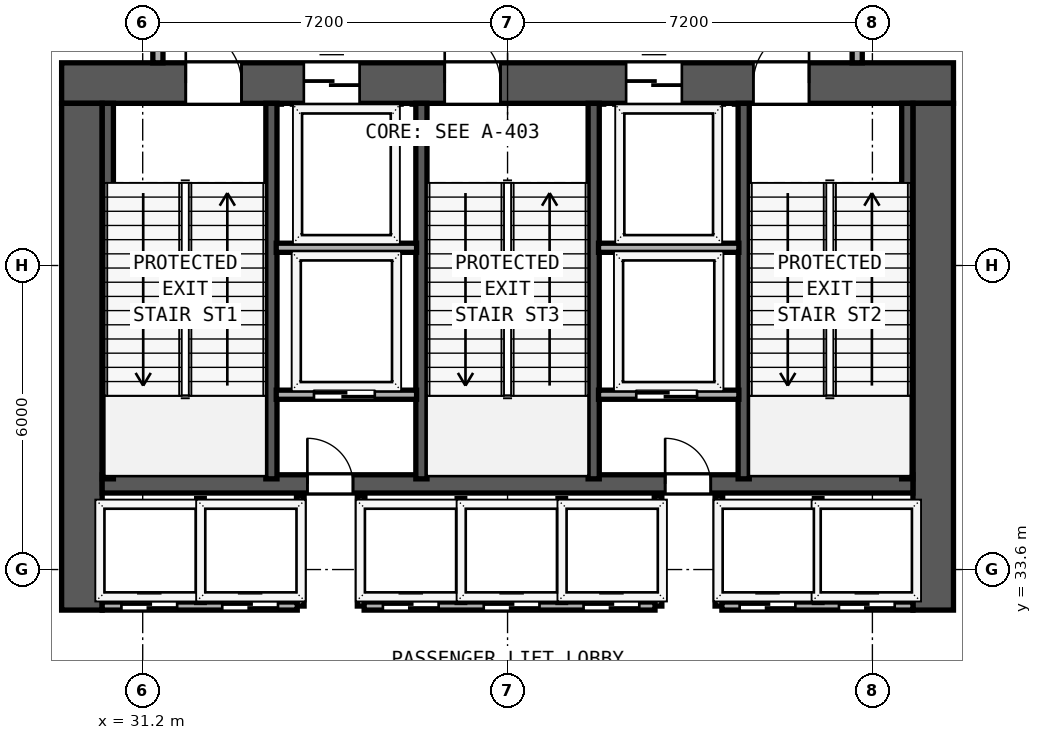
"""IFC4 building model, lengths in metres.
Left out: names, types, materials, properties, quantities, classifications, styles, units other than length and angle.
Written with IfcOpenShell. Run it as: python <this file> out.ifc"""

import sys

from ifc_helpers import new_model, si_unit, direction, frame, frame_2d, origin, place, context, subcontext, project, spatial, rectangle, extrude, element, fill, save


model = new_model("IFC4")
c1 = context("Model", 3, precision=1e-05, world=origin(), true_north=direction((0.0, 1.0)))
c2 = subcontext(c1, "Body", "Model", "MODEL_VIEW")
j1 = project(units=[si_unit("LENGTHUNIT", "METRE"), si_unit("PLANEANGLEUNIT", "RADIAN")], contexts=[c1])
p1 = place(None, origin())
s1 = spatial("IfcSite", under=j1, at=p1, CompositionType="ELEMENT")
p2 = place(p1, origin())
s2 = spatial("IfcBuilding", under=s1, at=p2, CompositionType="ELEMENT")
p3 = place(p2, origin())
s3 = spatial("IfcBuildingStorey", under=s2, at=p3, CompositionType="ELEMENT", Elevation=0.0)
p4 = place(p3, frame((29.6, 43.2, 0.0), z_axis=(0.0, 0.0, 1.0), x_axis=(1.0, 0.0, 0.0)))
e1 = element("IfcWall", 1, at=p4, inside=s3, PredefinedType="SHEAR", context=c2, shape_type="SweptSolid", body=[
    extrude(rectangle(XDim=17.6, YDim=0.8, at=frame_2d((8.8, 0.0))), origin(), (0.0, 0.0, 1.0), 5.16),
])
p5 = place(p4, frame((2.45, 0.0, 0.0)))
e2 = element("IfcOpeningElement", 2, at=p5, cuts=e1, PredefinedType="OPENING", context=c2, shape_type="SweptSolid", body=[
    extrude(rectangle(XDim=1.1, YDim=2.15, at=frame_2d((0.55, 1.075))), frame((0.0, 0.41, 0.0), z_axis=(0.0, -1.0, 0.0), x_axis=(1.0, 0.0, 0.0)), (0.0, 0.0, 1.0), 0.82),
])
p6 = place(p4, frame((7.56, 0.0, 0.0)))
e3 = element("IfcOpeningElement", 3, at=p6, cuts=e1, PredefinedType="OPENING", context=c2, shape_type="SweptSolid", body=[
    extrude(rectangle(XDim=1.1, YDim=2.15, at=frame_2d((0.55, 1.075))), frame((0.0, 0.41, 0.0), z_axis=(0.0, -1.0, 0.0), x_axis=(1.0, 0.0, 0.0)), (0.0, 0.0, 1.0), 0.82),
])
p7 = place(p4, frame((13.65, 0.0, 0.0)))
e4 = element("IfcOpeningElement", 4, at=p7, cuts=e1, PredefinedType="OPENING", context=c2, shape_type="SweptSolid", body=[
    extrude(rectangle(XDim=1.1, YDim=2.15, at=frame_2d((0.55, 1.075))), frame((0.0, 0.41, 0.0), z_axis=(0.0, -1.0, 0.0), x_axis=(1.0, 0.0, 0.0)), (0.0, 0.0, 1.0), 0.82),
])
p8 = place(p4, frame((4.78, 0.0, 0.0)))
e5 = element("IfcOpeningElement", 5, at=p8, cuts=e1, PredefinedType="OPENING", context=c2, shape_type="SweptSolid", body=[
    extrude(rectangle(XDim=1.1, YDim=2.2, at=frame_2d((0.55, 1.1))), frame((0.0, 0.41, 0.0), z_axis=(0.0, -1.0, 0.0), x_axis=(1.0, 0.0, 0.0)), (0.0, 0.0, 1.0), 0.82),
])
p9 = place(p4, frame((11.14, 0.0, 0.0)))
e6 = element("IfcOpeningElement", 6, at=p9, cuts=e1, PredefinedType="OPENING", context=c2, shape_type="SweptSolid", body=[
    extrude(rectangle(XDim=1.1, YDim=2.2, at=frame_2d((0.55, 1.1))), frame((0.0, 0.41, 0.0), z_axis=(0.0, -1.0, 0.0), x_axis=(1.0, 0.0, 0.0)), (0.0, 0.0, 1.0), 0.82),
])
for number, where, z_axis, x_axis in (
    (7, (30.0, 32.8, 0.0), (0.0, 0.0, 1.0), (0.0, 1.0, 0.0)),
    (8, (46.8, 32.8, 0.0), (0.0, 0.0, 1.0), (0.0, 1.0, 0.0)),
):
    element("IfcWall", number, at=place(p3, frame(where, z_axis=z_axis, x_axis=x_axis)), inside=s3, PredefinedType="SHEAR", context=c2, shape_type="SweptSolid", body=[
        extrude(rectangle(XDim=10.0, YDim=0.8, at=frame_2d((5.0, 0.0))), origin(), (0.0, 0.0, 1.0), 5.16),
    ])
p10 = place(p3, frame((30.4, 35.29, 0.0), z_axis=(0.0, 0.0, 1.0), x_axis=(1.0, 0.0, 0.0)))
e9 = element("IfcWall", 9, at=p10, inside=s3, PredefinedType="SHEAR", context=c2, shape_type="SweptSolid", body=[
    extrude(rectangle(XDim=16.0, YDim=0.36, at=frame_2d((8.0, 0.0))), origin(), (0.0, 0.0, 1.0), 5.16),
])
p11 = place(p10, frame((4.95, 0.0, 0.0), z_axis=(0.0, 0.0, 1.0), x_axis=(-1.0, 0.0, 0.0)))
e10 = element("IfcOpeningElement", 10, at=p11, cuts=e9, PredefinedType="OPENING", context=c2, shape_type="SweptSolid", body=[
    extrude(rectangle(XDim=0.9, YDim=2.1, at=frame_2d((0.45, 1.05))), frame((0.0, 0.19, 0.0), z_axis=(0.0, -1.0, 0.0), x_axis=(1.0, 0.0, 0.0)), (0.0, 0.0, 1.0), 0.38),
])
p12 = place(p10, frame((12.01, 0.0, 0.0), z_axis=(0.0, 0.0, 1.0), x_axis=(-1.0, 0.0, 0.0)))
e11 = element("IfcOpeningElement", 11, at=p12, cuts=e9, PredefinedType="OPENING", context=c2, shape_type="SweptSolid", body=[
    extrude(rectangle(XDim=0.9, YDim=2.1, at=frame_2d((0.45, 1.05))), frame((0.0, 0.19, 0.0), z_axis=(0.0, -1.0, 0.0), x_axis=(1.0, 0.0, 0.0)), (0.0, 0.0, 1.0), 0.38),
])
for number, where, z_axis, x_axis in (
    (12, (30.512, 35.39, 0.0), (0.0, 0.0, 1.0), (0.0, 1.0, 0.0)),
    (13, (33.74, 35.39, 0.0), (0.0, 0.0, 1.0), (0.0, 1.0, 0.0)),
    (14, (36.7, 35.39, 0.0), (0.0, 0.0, 1.0), (0.0, 1.0, 0.0)),
    (15, (40.1, 35.39, 0.0), (0.0, 0.0, 1.0), (0.0, 1.0, 0.0)),
    (16, (43.06, 35.39, 0.0), (0.0, 0.0, 1.0), (0.0, 1.0, 0.0)),
    (17, (46.288, 35.39, 0.0), (0.0, 0.0, 1.0), (0.0, 1.0, 0.0)),
):
    element("IfcWall", number, at=place(p3, frame(where, z_axis=z_axis, x_axis=x_axis)), inside=s3, PredefinedType="SHEAR", context=c2, shape_type="SweptSolid", body=[
        extrude(rectangle(XDim=7.41, YDim=0.22, at=frame_2d((3.705, 0.0))), origin(), (0.0, 0.0, 1.0), 5.16),
    ])
for number, where, z_axis, x_axis in (
    (18, (31.5, 43.6, 0.0), (0.0, 0.0, 1.0), (0.0, 1.0, 0.0)),
    (19, (45.3, 43.6, 0.0), (0.0, 0.0, 1.0), (0.0, 1.0, 0.0)),
):
    element("IfcWall", number, at=place(p3, frame(where, z_axis=z_axis, x_axis=x_axis)), inside=s3, PredefinedType="SOLIDWALL", context=c2, shape_type="SweptSolid", body=[
        extrude(rectangle(XDim=2.835, YDim=0.2, at=frame_2d((1.417, 0.0))), origin(), (0.0, 0.0, 1.0), 5.16),
    ])
for number, where, z_axis, x_axis in (
    (20, (33.835, 39.95, 0.0), (0.0, 0.0, 1.0), (1.0, 0.0, 0.0)),
    (21, (40.195, 39.95, 0.0), (0.0, 0.0, 1.0), (1.0, 0.0, 0.0)),
):
    element("IfcWall", number, at=place(p3, frame(where, z_axis=z_axis, x_axis=x_axis)), inside=s3, PredefinedType="SOLIDWALL", context=c2, shape_type="SweptSolid", body=[
        extrude(rectangle(XDim=2.77, YDim=0.18, at=frame_2d((1.385, 0.0))), origin(), (0.0, 0.0, 1.0), 5.16),
    ])
p13 = place(p3, frame((33.835, 37.05, 0.0), z_axis=(0.0, 0.0, 1.0), x_axis=(1.0, 0.0, 0.0)))
e22 = element("IfcWall", 22, at=p13, inside=s3, PredefinedType="SOLIDWALL", context=c2, shape_type="SweptSolid", body=[
    extrude(rectangle(XDim=2.77, YDim=0.18, at=frame_2d((1.385, 0.0))), origin(), (0.0, 0.0, 1.0), 5.16),
])
p14 = place(p13, frame((1.945, 0.0, 0.0), z_axis=(0.0, 0.0, 1.0), x_axis=(-1.0, 0.0, 0.0)))
e23 = element("IfcOpeningElement", 23, at=p14, cuts=e22, PredefinedType="OPENING", context=c2, shape_type="SweptSolid", body=[
    extrude(rectangle(XDim=1.2, YDim=2.2, at=frame_2d((0.6, 1.1))), frame((0.0, 0.1, 0.0), z_axis=(0.0, -1.0, 0.0), x_axis=(1.0, 0.0, 0.0)), (0.0, 0.0, 1.0), 0.2),
])
for number, where, z_axis, x_axis in (
    (24, (34.31, 32.88, 0.0), (0.0, 0.0, 1.0), (0.0, 1.0, 0.0)),
    (25, (35.51, 32.88, 0.0), (0.0, 0.0, 1.0), (0.0, 1.0, 0.0)),
):
    element("IfcWall", number, at=place(p3, frame(where, z_axis=z_axis, x_axis=x_axis)), inside=s3, PredefinedType="SOLIDWALL", context=c2, shape_type="SweptSolid", body=[
        extrude(rectangle(XDim=2.17, YDim=0.15, at=frame_2d((1.085, 0.0))), origin(), (0.0, 0.0, 1.0), 5.16),
    ])
p15 = place(p3, frame((40.195, 37.05, 0.0), z_axis=(0.0, 0.0, 1.0), x_axis=(1.0, 0.0, 0.0)))
e26 = element("IfcWall", 26, at=p15, inside=s3, PredefinedType="SOLIDWALL", context=c2, shape_type="SweptSolid", body=[
    extrude(rectangle(XDim=2.77, YDim=0.18, at=frame_2d((1.385, 0.0))), origin(), (0.0, 0.0, 1.0), 5.16),
])
p16 = place(p15, frame((1.945, 0.0, 0.0), z_axis=(0.0, 0.0, 1.0), x_axis=(-1.0, 0.0, 0.0)))
e27 = element("IfcOpeningElement", 27, at=p16, cuts=e26, PredefinedType="OPENING", context=c2, shape_type="SweptSolid", body=[
    extrude(rectangle(XDim=1.2, YDim=2.2, at=frame_2d((0.6, 1.1))), frame((0.0, 0.1, 0.0), z_axis=(0.0, -1.0, 0.0), x_axis=(1.0, 0.0, 0.0)), (0.0, 0.0, 1.0), 0.2),
])
for number, where, z_axis, x_axis in (
    (28, (41.37, 32.88, 0.0), (0.0, 0.0, 1.0), (0.0, 1.0, 0.0)),
    (29, (42.57, 32.88, 0.0), (0.0, 0.0, 1.0), (0.0, 1.0, 0.0)),
):
    element("IfcWall", number, at=place(p3, frame(where, z_axis=z_axis, x_axis=x_axis)), inside=s3, PredefinedType="SOLIDWALL", context=c2, shape_type="SweptSolid", body=[
        extrude(rectangle(XDim=2.17, YDim=0.15, at=frame_2d((1.085, 0.0))), origin(), (0.0, 0.0, 1.0), 5.16),
    ])
p17 = place(p3, frame((30.4, 32.88, 0.0), z_axis=(0.0, 0.0, 1.0), x_axis=(1.0, 0.0, 0.0)))
e30 = element("IfcWall", 30, at=p17, inside=s3, PredefinedType="SOLIDWALL", context=c2, shape_type="SweptSolid", body=[
    extrude(rectangle(XDim=3.85, YDim=0.16, at=frame_2d((1.925, 0.0))), origin(), (0.0, 0.0, 1.0), 5.16),
])
p18 = place(p17, frame((1.48, 0.0, 0.0), z_axis=(0.0, 0.0, 1.0), x_axis=(-1.0, 0.0, 0.0)))
e31 = element("IfcOpeningElement", 31, at=p18, cuts=e30, PredefinedType="OPENING", context=c2, shape_type="SweptSolid", body=[
    extrude(rectangle(XDim=1.1, YDim=2.2, at=frame_2d((0.55, 1.1))), frame((0.0, 0.09, 0.0), z_axis=(0.0, -1.0, 0.0), x_axis=(1.0, 0.0, 0.0)), (0.0, 0.0, 1.0), 0.18),
])
p19 = place(p17, frame((3.47, 0.0, 0.0), z_axis=(0.0, 0.0, 1.0), x_axis=(-1.0, 0.0, 0.0)))
e32 = element("IfcOpeningElement", 32, at=p19, cuts=e30, PredefinedType="OPENING", context=c2, shape_type="SweptSolid", body=[
    extrude(rectangle(XDim=1.1, YDim=2.2, at=frame_2d((0.55, 1.1))), frame((0.0, 0.09, 0.0), z_axis=(0.0, -1.0, 0.0), x_axis=(1.0, 0.0, 0.0)), (0.0, 0.0, 1.0), 0.18),
])
p20 = place(p3, frame((35.57, 32.88, 0.0), z_axis=(0.0, 0.0, 1.0), x_axis=(1.0, 0.0, 0.0)))
e33 = element("IfcWall", 33, at=p20, inside=s3, PredefinedType="SOLIDWALL", context=c2, shape_type="SweptSolid", body=[
    extrude(rectangle(XDim=5.74, YDim=0.16, at=frame_2d((2.87, 0.0))), origin(), (0.0, 0.0, 1.0), 5.16),
])
p21 = place(p20, frame((1.47, 0.0, 0.0), z_axis=(0.0, 0.0, 1.0), x_axis=(-1.0, 0.0, 0.0)))
e34 = element("IfcOpeningElement", 34, at=p21, cuts=e33, PredefinedType="OPENING", context=c2, shape_type="SweptSolid", body=[
    extrude(rectangle(XDim=1.1, YDim=2.2, at=frame_2d((0.55, 1.1))), frame((0.0, 0.09, 0.0), z_axis=(0.0, -1.0, 0.0), x_axis=(1.0, 0.0, 0.0)), (0.0, 0.0, 1.0), 0.18),
])
p22 = place(p20, frame((3.46, 0.0, 0.0), z_axis=(0.0, 0.0, 1.0), x_axis=(-1.0, 0.0, 0.0)))
e35 = element("IfcOpeningElement", 35, at=p22, cuts=e33, PredefinedType="OPENING", context=c2, shape_type="SweptSolid", body=[
    extrude(rectangle(XDim=1.1, YDim=2.2, at=frame_2d((0.55, 1.1))), frame((0.0, 0.09, 0.0), z_axis=(0.0, -1.0, 0.0), x_axis=(1.0, 0.0, 0.0)), (0.0, 0.0, 1.0), 0.18),
])
p23 = place(p20, frame((5.43, 0.0, 0.0), z_axis=(0.0, 0.0, 1.0), x_axis=(-1.0, 0.0, 0.0)))
e36 = element("IfcOpeningElement", 36, at=p23, cuts=e33, PredefinedType="OPENING", context=c2, shape_type="SweptSolid", body=[
    extrude(rectangle(XDim=1.1, YDim=2.2, at=frame_2d((0.55, 1.1))), frame((0.0, 0.09, 0.0), z_axis=(0.0, -1.0, 0.0), x_axis=(1.0, 0.0, 0.0)), (0.0, 0.0, 1.0), 0.18),
])
p24 = place(p3, frame((42.63, 32.88, 0.0), z_axis=(0.0, 0.0, 1.0), x_axis=(1.0, 0.0, 0.0)))
e37 = element("IfcWall", 37, at=p24, inside=s3, PredefinedType="SOLIDWALL", context=c2, shape_type="SweptSolid", body=[
    extrude(rectangle(XDim=3.77, YDim=0.16, at=frame_2d((1.885, 0.0))), origin(), (0.0, 0.0, 1.0), 5.16),
])
p25 = place(p24, frame((1.45, 0.0, 0.0), z_axis=(0.0, 0.0, 1.0), x_axis=(-1.0, 0.0, 0.0)))
e38 = element("IfcOpeningElement", 38, at=p25, cuts=e37, PredefinedType="OPENING", context=c2, shape_type="SweptSolid", body=[
    extrude(rectangle(XDim=1.1, YDim=2.2, at=frame_2d((0.55, 1.1))), frame((0.0, 0.09, 0.0), z_axis=(0.0, -1.0, 0.0), x_axis=(1.0, 0.0, 0.0)), (0.0, 0.0, 1.0), 0.18),
])
p26 = place(p24, frame((3.41, 0.0, 0.0), z_axis=(0.0, 0.0, 1.0), x_axis=(-1.0, 0.0, 0.0)))
e39 = element("IfcOpeningElement", 39, at=p26, cuts=e37, PredefinedType="OPENING", context=c2, shape_type="SweptSolid", body=[
    extrude(rectangle(XDim=1.1, YDim=2.2, at=frame_2d((0.55, 1.1))), frame((0.0, 0.09, 0.0), z_axis=(0.0, -1.0, 0.0), x_axis=(1.0, 0.0, 0.0)), (0.0, 0.0, 1.0), 0.18),
])
for number, where, z_axis, x_axis in (
    (40, (32.34, 32.95, 0.0), (0.0, 0.0, 1.0), (0.0, 1.0, 0.0)),
    (41, (37.48, 32.95, 0.0), (0.0, 0.0, 1.0), (0.0, 1.0, 0.0)),
    (42, (39.47, 32.95, 0.0), (0.0, 0.0, 1.0), (0.0, 1.0, 0.0)),
    (43, (44.53, 32.95, 0.0), (0.0, 0.0, 1.0), (0.0, 1.0, 0.0)),
):
    element("IfcWall", number, at=place(p3, frame(where, z_axis=z_axis, x_axis=x_axis)), inside=s3, PredefinedType="SOLIDWALL", context=c2, shape_type="SweptSolid", body=[
        extrude(rectangle(XDim=2.05, YDim=0.15, at=frame_2d((1.025, 0.0))), origin(), (0.0, 0.0, 1.0), 5.16),
    ])
p27 = place(p5, origin())
e44 = element("IfcDoor", 44, at=p27, inside=s3, OperationType="SINGLE_SWING_LEFT", PredefinedType="DOOR", context=c2, shape_type="SweptSolid", body=[
    extrude(rectangle(XDim=1.1, YDim=2.15, at=frame_2d((0.55, 1.075))), frame((0.0, 0.185, 0.0), z_axis=(0.0, -1.0, 0.0), x_axis=(1.0, 0.0, 0.0)), (0.0, 0.0, 1.0), 0.05),
])
fill(e2, e44)
p28 = place(p6, origin())
e45 = element("IfcDoor", 45, at=p28, inside=s3, OperationType="SINGLE_SWING_LEFT", PredefinedType="DOOR", context=c2, shape_type="SweptSolid", body=[
    extrude(rectangle(XDim=1.1, YDim=2.15, at=frame_2d((0.55, 1.075))), frame((0.0, 0.185, 0.0), z_axis=(0.0, -1.0, 0.0), x_axis=(1.0, 0.0, 0.0)), (0.0, 0.0, 1.0), 0.05),
])
fill(e3, e45)
p29 = place(p7, origin())
e46 = element("IfcDoor", 46, at=p29, inside=s3, OperationType="SINGLE_SWING_RIGHT", PredefinedType="DOOR", context=c2, shape_type="SweptSolid", body=[
    extrude(rectangle(XDim=1.1, YDim=2.15, at=frame_2d((0.55, 1.075))), frame((0.0, 0.185, 0.0), z_axis=(0.0, -1.0, 0.0), x_axis=(1.0, 0.0, 0.0)), (0.0, 0.0, 1.0), 0.05),
])
fill(e4, e46)
p30 = place(p8, origin())
e47 = element("IfcDoor", 47, at=p30, inside=s3, OperationType="SLIDING_TO_LEFT", PredefinedType="DOOR", context=c2, shape_type="SweptSolid", body=[
    extrude(rectangle(XDim=1.1, YDim=2.2, at=frame_2d((0.55, 1.1))), frame((0.0, 0.185, 0.0), z_axis=(0.0, -1.0, 0.0), x_axis=(1.0, 0.0, 0.0)), (0.0, 0.0, 1.0), 0.05),
])
fill(e5, e47)
p31 = place(p9, origin())
e48 = element("IfcDoor", 48, at=p31, inside=s3, OperationType="SLIDING_TO_LEFT", PredefinedType="DOOR", context=c2, shape_type="SweptSolid", body=[
    extrude(rectangle(XDim=1.1, YDim=2.2, at=frame_2d((0.55, 1.1))), frame((0.0, 0.185, 0.0), z_axis=(0.0, -1.0, 0.0), x_axis=(1.0, 0.0, 0.0)), (0.0, 0.0, 1.0), 0.05),
])
fill(e6, e48)
p32 = place(p14, origin())
e49 = element("IfcDoor", 49, at=p32, inside=s3, OperationType="SLIDING_TO_RIGHT", PredefinedType="DOOR", context=c2, shape_type="SweptSolid", body=[
    extrude(rectangle(XDim=1.2, YDim=2.2, at=frame_2d((0.6, 1.1))), frame((0.0, 0.025, 0.0), z_axis=(0.0, -1.0, 0.0), x_axis=(1.0, 0.0, 0.0)), (0.0, 0.0, 1.0), 0.05),
])
fill(e23, e49)
p33 = place(p11, origin())
e50 = element("IfcDoor", 50, at=p33, inside=s3, OperationType="SINGLE_SWING_RIGHT", PredefinedType="DOOR", context=c2, shape_type="SweptSolid", body=[
    extrude(rectangle(XDim=0.9, YDim=2.1, at=frame_2d((0.45, 1.05))), frame((0.0, 0.025, 0.0), z_axis=(0.0, -1.0, 0.0), x_axis=(1.0, 0.0, 0.0)), (0.0, 0.0, 1.0), 0.05),
])
fill(e10, e50)
p34 = place(p16, origin())
e51 = element("IfcDoor", 51, at=p34, inside=s3, OperationType="SLIDING_TO_RIGHT", PredefinedType="DOOR", context=c2, shape_type="SweptSolid", body=[
    extrude(rectangle(XDim=1.2, YDim=2.2, at=frame_2d((0.6, 1.1))), frame((0.0, 0.025, 0.0), z_axis=(0.0, -1.0, 0.0), x_axis=(1.0, 0.0, 0.0)), (0.0, 0.0, 1.0), 0.05),
])
fill(e27, e51)
p35 = place(p12, origin())
e52 = element("IfcDoor", 52, at=p35, inside=s3, OperationType="SINGLE_SWING_RIGHT", PredefinedType="DOOR", context=c2, shape_type="SweptSolid", body=[
    extrude(rectangle(XDim=0.9, YDim=2.1, at=frame_2d((0.45, 1.05))), frame((0.0, 0.025, 0.0), z_axis=(0.0, -1.0, 0.0), x_axis=(1.0, 0.0, 0.0)), (0.0, 0.0, 1.0), 0.05),
])
fill(e11, e52)
p36 = place(p18, origin())
e53 = element("IfcDoor", 53, at=p36, inside=s3, OperationType="SLIDING_TO_LEFT", PredefinedType="DOOR", context=c2, shape_type="SweptSolid", body=[
    extrude(rectangle(XDim=1.1, YDim=2.2, at=frame_2d((0.55, 1.1))), frame((0.0, 0.025, 0.0), z_axis=(0.0, -1.0, 0.0), x_axis=(1.0, 0.0, 0.0)), (0.0, 0.0, 1.0), 0.05),
])
fill(e31, e53)
p37 = place(p19, origin())
e54 = element("IfcDoor", 54, at=p37, inside=s3, OperationType="SLIDING_TO_LEFT", PredefinedType="DOOR", context=c2, shape_type="SweptSolid", body=[
    extrude(rectangle(XDim=1.1, YDim=2.2, at=frame_2d((0.55, 1.1))), frame((0.0, 0.025, 0.0), z_axis=(0.0, -1.0, 0.0), x_axis=(1.0, 0.0, 0.0)), (0.0, 0.0, 1.0), 0.05),
])
fill(e32, e54)
p38 = place(p21, origin())
e55 = element("IfcDoor", 55, at=p38, inside=s3, OperationType="SLIDING_TO_LEFT", PredefinedType="DOOR", context=c2, shape_type="SweptSolid", body=[
    extrude(rectangle(XDim=1.1, YDim=2.2, at=frame_2d((0.55, 1.1))), frame((0.0, 0.025, 0.0), z_axis=(0.0, -1.0, 0.0), x_axis=(1.0, 0.0, 0.0)), (0.0, 0.0, 1.0), 0.05),
])
fill(e34, e55)
p39 = place(p22, origin())
e56 = element("IfcDoor", 56, at=p39, inside=s3, OperationType="SLIDING_TO_LEFT", PredefinedType="DOOR", context=c2, shape_type="SweptSolid", body=[
    extrude(rectangle(XDim=1.1, YDim=2.2, at=frame_2d((0.55, 1.1))), frame((0.0, 0.025, 0.0), z_axis=(0.0, -1.0, 0.0), x_axis=(1.0, 0.0, 0.0)), (0.0, 0.0, 1.0), 0.05),
])
fill(e35, e56)
p40 = place(p23, origin())
e57 = element("IfcDoor", 57, at=p40, inside=s3, OperationType="SLIDING_TO_RIGHT", PredefinedType="DOOR", context=c2, shape_type="SweptSolid", body=[
    extrude(rectangle(XDim=1.1, YDim=2.2, at=frame_2d((0.55, 1.1))), frame((0.0, 0.025, 0.0), z_axis=(0.0, -1.0, 0.0), x_axis=(1.0, 0.0, 0.0)), (0.0, 0.0, 1.0), 0.05),
])
fill(e36, e57)
p41 = place(p25, origin())
e58 = element("IfcDoor", 58, at=p41, inside=s3, OperationType="SLIDING_TO_RIGHT", PredefinedType="DOOR", context=c2, shape_type="SweptSolid", body=[
    extrude(rectangle(XDim=1.1, YDim=2.2, at=frame_2d((0.55, 1.1))), frame((0.0, 0.025, 0.0), z_axis=(0.0, -1.0, 0.0), x_axis=(1.0, 0.0, 0.0)), (0.0, 0.0, 1.0), 0.05),
])
fill(e38, e58)
p42 = place(p26, origin())
e59 = element("IfcDoor", 59, at=p42, inside=s3, OperationType="SLIDING_TO_RIGHT", PredefinedType="DOOR", context=c2, shape_type="SweptSolid", body=[
    extrude(rectangle(XDim=1.1, YDim=2.2, at=frame_2d((0.55, 1.1))), frame((0.0, 0.025, 0.0), z_axis=(0.0, -1.0, 0.0), x_axis=(1.0, 0.0, 0.0)), (0.0, 0.0, 1.0), 0.05),
])
fill(e39, e59)
save(model, sys.argv[1])
